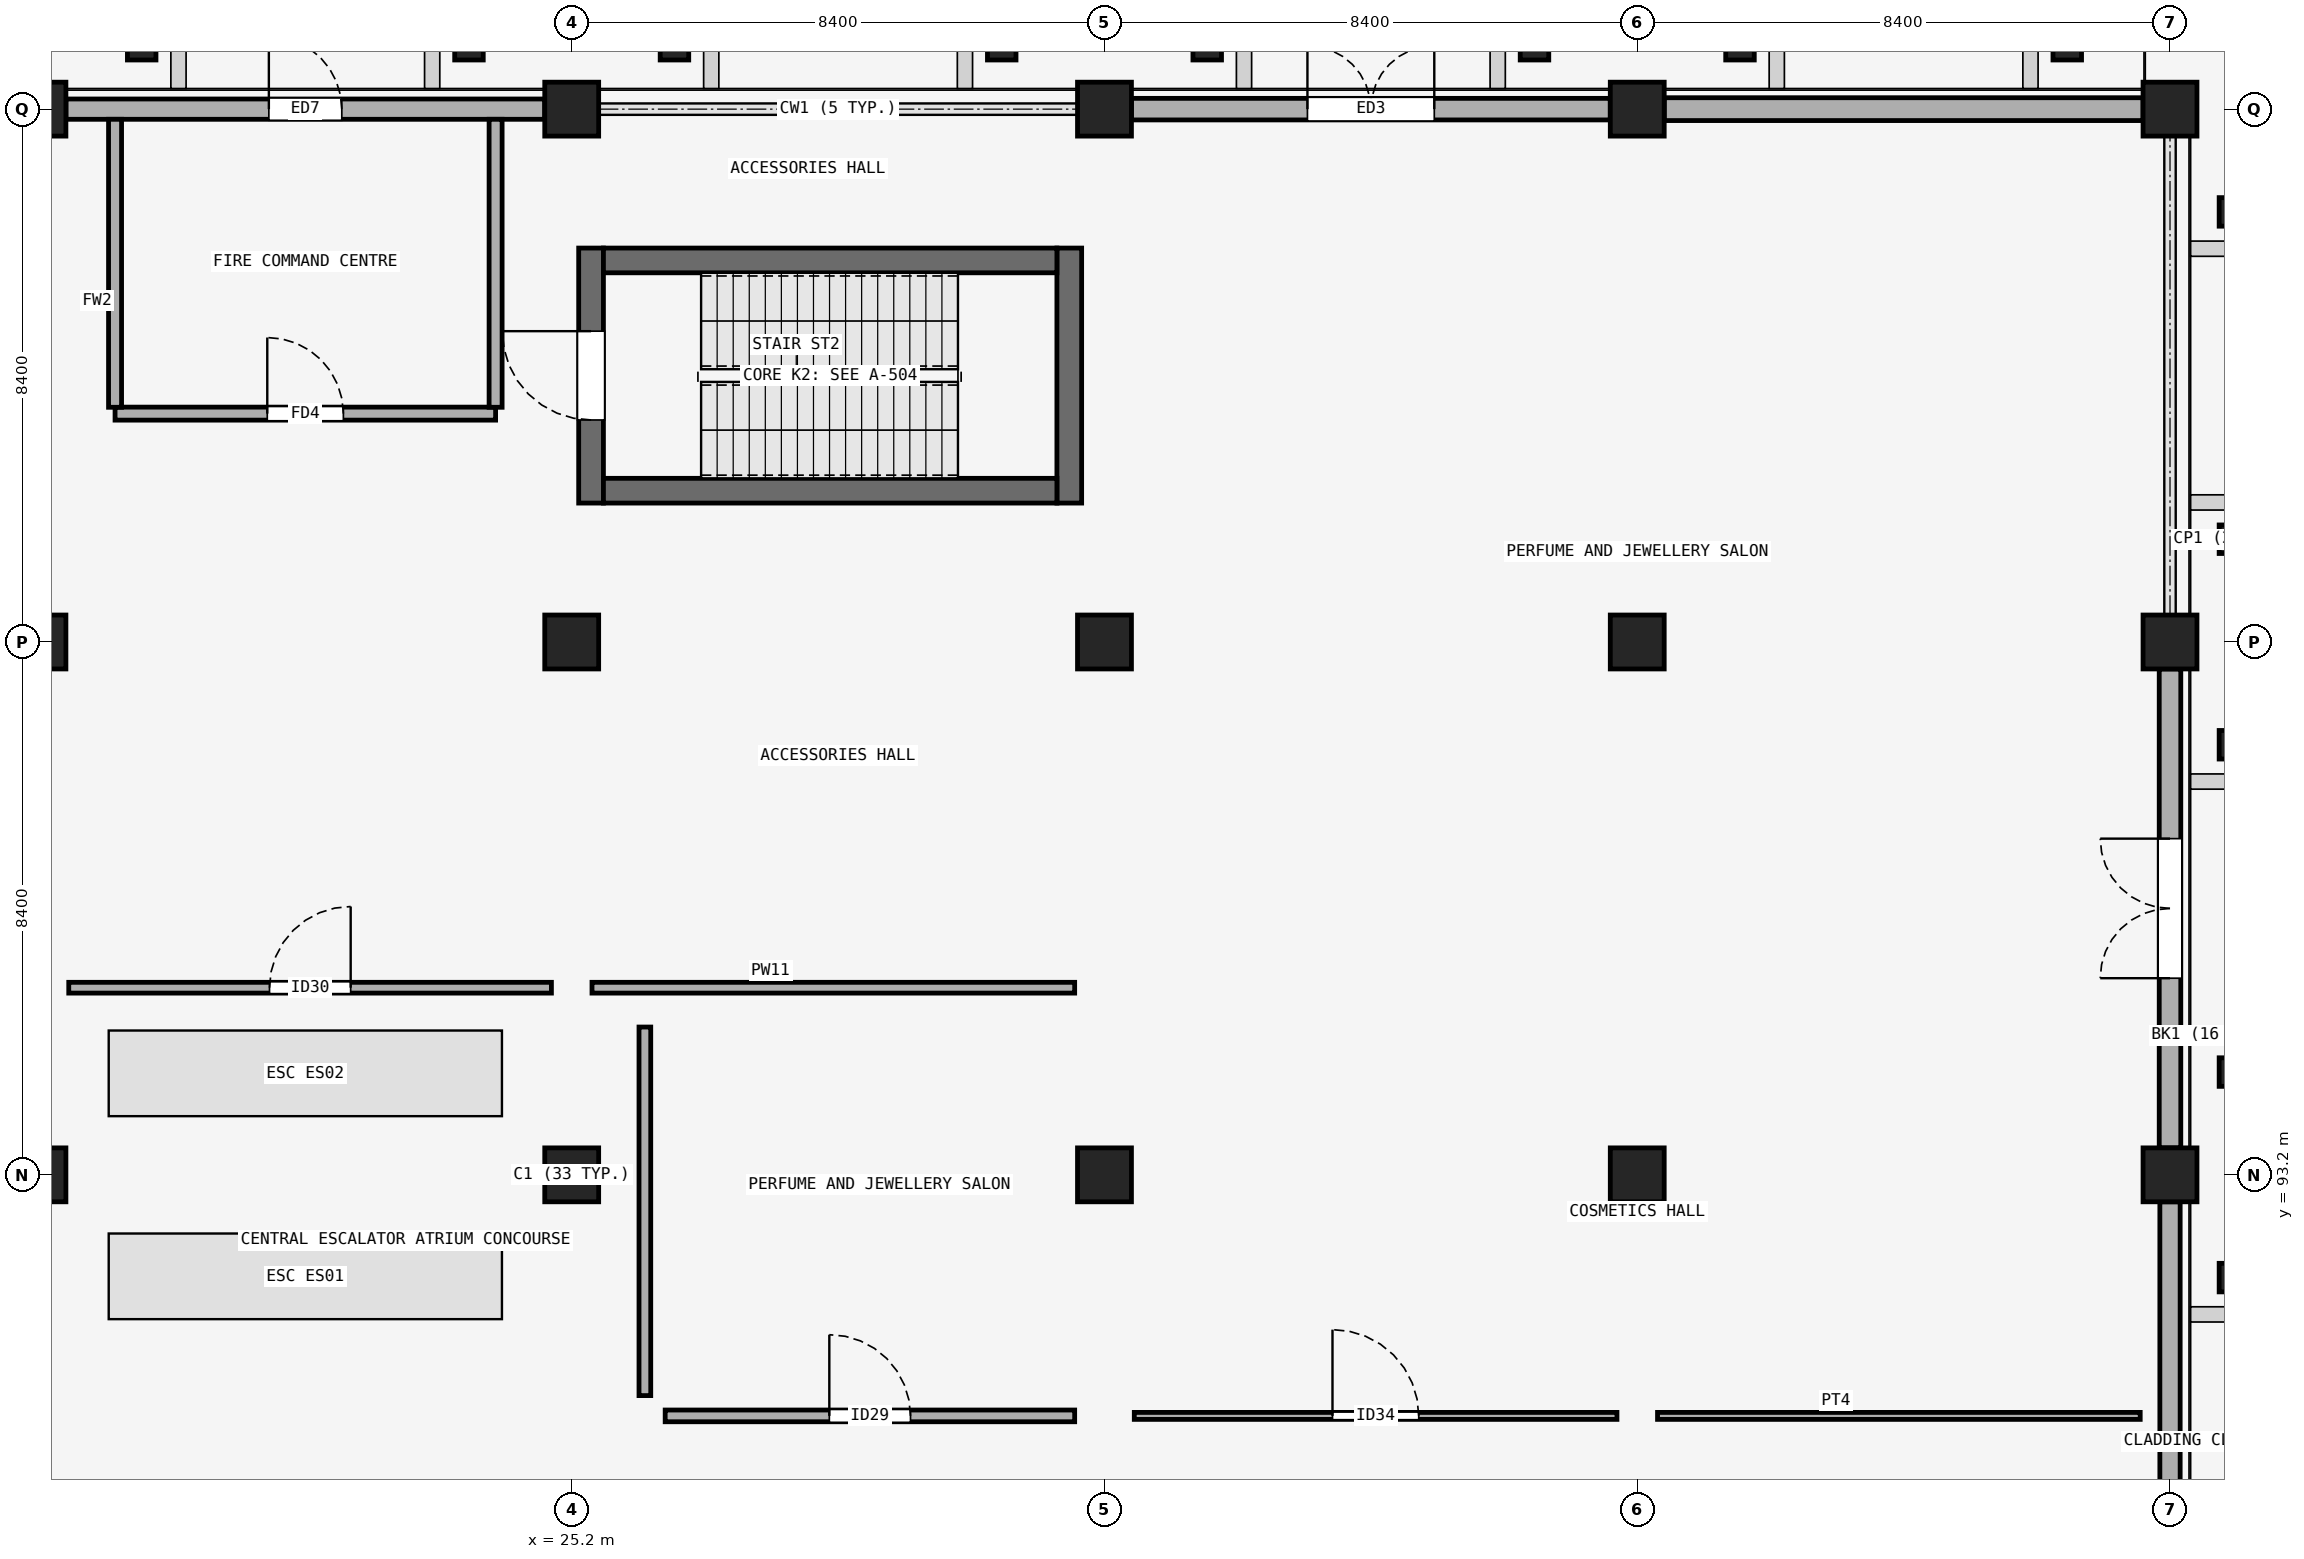
"""IFC4 building model, lengths in metres.
Left out: names, types, materials, properties, quantities, classifications, styles, units other than length and angle.
Written with IfcOpenShell. Run it as: python <this file> out.ifc"""

import sys

from ifc_helpers import new_model, si_unit, direction, frame, frame_2d, origin, origin_2d, place, context, subcontext, project, spatial, rectangle, extrude, element, fill, save


model = new_model("IFC4")
c1 = context("Model", 3, precision=1e-05, world=origin(), true_north=direction((0.0, 1.0)))
c2 = subcontext(c1, "Body", "Model", "MODEL_VIEW")
j1 = project(units=[si_unit("LENGTHUNIT", "METRE"), si_unit("PLANEANGLEUNIT", "RADIAN")], contexts=[c1])
p1 = place(None, origin())
s1 = spatial("IfcSite", under=j1, at=p1, CompositionType="ELEMENT")
p2 = place(p1, origin())
s2 = spatial("IfcBuilding", under=s1, at=p2, CompositionType="ELEMENT")
p3 = place(p2, origin())
s3 = spatial("IfcBuildingStorey", under=s2, at=p3, CompositionType="ELEMENT", Elevation=0.0)
for number, where, z_axis, x_axis in (
    (1, (16.8, 93.2, 0.0), (0.0, 0.0, 1.0), (1.0, 0.0, 0.0)),
    (2, (25.2, 93.2, 0.0), (0.0, 0.0, 1.0), (1.0, 0.0, 0.0)),
    (3, (33.6, 93.2, 0.0), (0.0, 0.0, 1.0), (1.0, 0.0, 0.0)),
    (4, (42.0, 93.2, 0.0), (0.0, 0.0, 1.0), (1.0, 0.0, 0.0)),
    (5, (50.4, 93.2, 0.0), (0.0, 0.0, 1.0), (1.0, 0.0, 0.0)),
    (6, (16.8, 101.6, 0.0), (0.0, 0.0, 1.0), (1.0, 0.0, 0.0)),
    (7, (25.2, 101.6, 0.0), (0.0, 0.0, 1.0), (1.0, 0.0, 0.0)),
    (8, (33.6, 101.6, 0.0), (0.0, 0.0, 1.0), (1.0, 0.0, 0.0)),
    (9, (42.0, 101.6, 0.0), (0.0, 0.0, 1.0), (1.0, 0.0, 0.0)),
    (10, (50.4, 101.6, 0.0), (0.0, 0.0, 1.0), (1.0, 0.0, 0.0)),
    (11, (16.8, 110.0, 0.0), (0.0, 0.0, 1.0), (1.0, 0.0, 0.0)),
    (12, (25.2, 110.0, 0.0), (0.0, 0.0, 1.0), (1.0, 0.0, 0.0)),
    (13, (33.6, 110.0, 0.0), (0.0, 0.0, 1.0), (1.0, 0.0, 0.0)),
    (14, (42.0, 110.0, 0.0), (0.0, 0.0, 1.0), (1.0, 0.0, 0.0)),
    (15, (50.4, 110.0, 0.0), (0.0, 0.0, 1.0), (1.0, 0.0, 0.0)),
):
    element("IfcColumn", number, at=place(p3, frame(where, z_axis=z_axis, x_axis=x_axis)), inside=s3, PredefinedType="COLUMN", context=c2, shape_type="SweptSolid", body=[
        extrude(rectangle(XDim=0.85, YDim=0.85, at=origin_2d()), origin(), (0.0, 0.0, 1.0), 5.4),
    ])
for number, where, z_axis, x_axis in (
    (16, (18.42, 111.05, 0.0), (0.0, 0.0, 1.0), (1.0, 0.0, 0.0)),
    (17, (23.58, 111.05, 0.0), (0.0, 0.0, 1.0), (1.0, 0.0, 0.0)),
    (18, (26.82, 111.05, 0.0), (0.0, 0.0, 1.0), (1.0, 0.0, 0.0)),
    (19, (31.98, 111.05, 0.0), (0.0, 0.0, 1.0), (1.0, 0.0, 0.0)),
    (20, (35.22, 111.05, 0.0), (0.0, 0.0, 1.0), (1.0, 0.0, 0.0)),
    (21, (40.38, 111.05, 0.0), (0.0, 0.0, 1.0), (1.0, 0.0, 0.0)),
    (22, (43.62, 111.05, 0.0), (0.0, 0.0, 1.0), (1.0, 0.0, 0.0)),
    (23, (48.78, 111.05, 0.0), (0.0, 0.0, 1.0), (1.0, 0.0, 0.0)),
    (24, (51.45, 91.58, 0.0), (0.0, 0.0, 1.0), (0.0, 1.0, 0.0)),
    (25, (51.45, 94.82, 0.0), (0.0, 0.0, 1.0), (0.0, 1.0, 0.0)),
    (26, (51.45, 99.98, 0.0), (0.0, 0.0, 1.0), (0.0, 1.0, 0.0)),
    (27, (51.45, 103.22, 0.0), (0.0, 0.0, 1.0), (0.0, 1.0, 0.0)),
    (28, (51.45, 108.38, 0.0), (0.0, 0.0, 1.0), (0.0, 1.0, 0.0)),
):
    element("IfcColumn", number, at=place(p3, frame(where, z_axis=z_axis, x_axis=x_axis)), inside=s3, PredefinedType="PILASTER", context=c2, shape_type="SweptSolid", body=[
        extrude(rectangle(XDim=0.45, YDim=0.55, at=origin_2d()), origin(), (0.0, 0.0, 1.0), 5.4),
    ])
p4 = place(p3, frame((17.225, 110.0, 0.0), z_axis=(0.0, 0.0, 1.0), x_axis=(1.0, 0.0, 0.0)))
e29 = element("IfcWall", 29, at=p4, inside=s3, PredefinedType="SOLIDWALL", context=c2, shape_type="SweptSolid", body=[
    extrude(rectangle(XDim=7.55, YDim=0.32, at=frame_2d((3.775, 0.0))), origin(), (0.0, 0.0, 1.0), 4.35),
])
p5 = place(p4, frame((3.2, 0.0, 0.0)))
e30 = element("IfcOpeningElement", 30, at=p5, cuts=e29, PredefinedType="OPENING", context=c2, shape_type="SweptSolid", body=[
    extrude(rectangle(XDim=1.15, YDim=2.15, at=frame_2d((0.575, 1.075))), frame((0.0, 0.17, 0.0), z_axis=(0.0, -1.0, 0.0), x_axis=(1.0, 0.0, 0.0)), (0.0, 0.0, 1.0), 0.34),
])
p6 = place(p3, frame((34.025, 110.0, 0.0), z_axis=(0.0, 0.0, 1.0), x_axis=(1.0, 0.0, 0.0)))
e31 = element("IfcWall", 31, at=p6, inside=s3, PredefinedType="SOLIDWALL", context=c2, shape_type="SweptSolid", body=[
    extrude(rectangle(XDim=7.55, YDim=0.34, at=frame_2d((3.775, 0.0))), origin(), (0.0, 0.0, 1.0), 4.35),
])
p7 = place(p6, frame((2.775, 0.0, 0.0)))
e32 = element("IfcOpeningElement", 32, at=p7, cuts=e31, PredefinedType="OPENING", context=c2, shape_type="SweptSolid", body=[
    extrude(rectangle(XDim=2.0, YDim=2.5, at=frame_2d((1.0, 1.25))), frame((0.0, 0.18, 0.0), z_axis=(0.0, -1.0, 0.0), x_axis=(1.0, 0.0, 0.0)), (0.0, 0.0, 1.0), 0.36),
])
p8 = place(p3, frame((42.425, 110.0, 0.0), z_axis=(0.0, 0.0, 1.0), x_axis=(1.0, 0.0, 0.0)))
e33 = element("IfcWall", 33, at=p8, inside=s3, PredefinedType="SOLIDWALL", context=c2, shape_type="SweptSolid", body=[
    extrude(rectangle(XDim=7.55, YDim=0.36, at=frame_2d((3.775, 0.0))), origin(), (0.0, 0.0, 1.0), 4.35),
])
p9 = place(p3, frame((50.4, 85.225, 0.0), z_axis=(0.0, 0.0, 1.0), x_axis=(0.0, 1.0, 0.0)))
e34 = element("IfcWall", 34, at=p9, inside=s3, PredefinedType="SOLIDWALL", context=c2, shape_type="SweptSolid", body=[
    extrude(rectangle(XDim=7.55, YDim=0.32, at=frame_2d((3.775, 0.0))), origin(), (0.0, 0.0, 1.0), 4.35),
])
p10 = place(p3, frame((50.4, 93.625, 0.0), z_axis=(0.0, 0.0, 1.0), x_axis=(0.0, 1.0, 0.0)))
e35 = element("IfcWall", 35, at=p10, inside=s3, PredefinedType="SOLIDWALL", context=c2, shape_type="SweptSolid", body=[
    extrude(rectangle(XDim=7.55, YDim=0.34, at=frame_2d((3.775, 0.0))), origin(), (0.0, 0.0, 1.0), 4.35),
])
p11 = place(p10, frame((2.675, 0.0, 0.0)))
e36 = element("IfcOpeningElement", 36, at=p11, cuts=e35, PredefinedType="OPENING", context=c2, shape_type="SweptSolid", body=[
    extrude(rectangle(XDim=2.2, YDim=2.55, at=frame_2d((1.1, 1.275))), frame((0.0, 0.18, 0.0), z_axis=(0.0, -1.0, 0.0), x_axis=(1.0, 0.0, 0.0)), (0.0, 0.0, 1.0), 0.36),
])
p12 = place(p3, frame((25.505, 103.79, 0.0), z_axis=(0.0, 0.0, 1.0), x_axis=(0.0, 1.0, 0.0)))
e37 = element("IfcWall", 37, at=p12, inside=s3, PredefinedType="SHEAR", context=c2, shape_type="SweptSolid", body=[
    extrude(rectangle(XDim=4.02, YDim=0.39, at=frame_2d((2.01, 0.0))), origin(), (0.0, 0.0, 1.0), 5.1),
])
p13 = place(p12, frame((1.31, 0.0, 0.0)))
e38 = element("IfcOpeningElement", 38, at=p13, cuts=e37, PredefinedType="OPENING", context=c2, shape_type="SweptSolid", body=[
    extrude(rectangle(XDim=1.4, YDim=2.15, at=frame_2d((0.7, 1.075))), frame((0.0, 0.205, 0.0), z_axis=(0.0, -1.0, 0.0), x_axis=(1.0, 0.0, 0.0)), (0.0, 0.0, 1.0), 0.41),
])
p14 = place(p3, frame((33.045, 103.79, 0.0), z_axis=(0.0, 0.0, 1.0), x_axis=(0.0, 1.0, 0.0)))
e39 = element("IfcWall", 39, at=p14, inside=s3, PredefinedType="SHEAR", context=c2, shape_type="SweptSolid", body=[
    extrude(rectangle(XDim=4.02, YDim=0.39, at=frame_2d((2.01, 0.0))), origin(), (0.0, 0.0, 1.0), 5.1),
])
for number, where, z_axis, x_axis in (
    (40, (25.7, 103.985, 0.0), (0.0, 0.0, 1.0), (1.0, 0.0, 0.0)),
    (41, (25.7, 107.615, 0.0), (0.0, 0.0, 1.0), (1.0, 0.0, 0.0)),
):
    element("IfcWall", number, at=place(p3, frame(where, z_axis=z_axis, x_axis=x_axis)), inside=s3, PredefinedType="SHEAR", context=c2, shape_type="SweptSolid", body=[
        extrude(rectangle(XDim=7.15, YDim=0.39, at=frame_2d((3.575, 0.0))), origin(), (0.0, 0.0, 1.0), 5.1),
    ])
p15 = place(p3, frame((18.0, 105.2, 0.0), z_axis=(0.0, 0.0, 1.0), x_axis=(1.0, 0.0, 0.0)))
e42 = element("IfcWall", 42, at=p15, inside=s3, PredefinedType="PARTITIONING", context=c2, shape_type="SweptSolid", body=[
    extrude(rectangle(XDim=6.0, YDim=0.205, at=frame_2d((3.0, 0.0))), origin(), (0.0, 0.0, 1.0), 5.1),
])
p16 = place(p15, frame((2.4, 0.0, 0.0)))
e43 = element("IfcOpeningElement", 43, at=p16, cuts=e42, PredefinedType="OPENING", context=c2, shape_type="SweptSolid", body=[
    extrude(rectangle(XDim=1.2, YDim=2.2, at=frame_2d((0.6, 1.1))), frame((0.0, 0.113, 0.0), z_axis=(0.0, -1.0, 0.0), x_axis=(1.0, 0.0, 0.0)), (0.0, 0.0, 1.0), 0.225),
])
for number, where, z_axis, x_axis in (
    (44, (18.0, 105.3, 0.0), (0.0, 0.0, 1.0), (0.0, 1.0, 0.0)),
    (45, (24.0, 105.3, 0.0), (0.0, 0.0, 1.0), (0.0, 1.0, 0.0)),
):
    element("IfcWall", number, at=place(p3, frame(where, z_axis=z_axis, x_axis=x_axis)), inside=s3, PredefinedType="PARTITIONING", context=c2, shape_type="SweptSolid", body=[
        extrude(rectangle(XDim=4.54, YDim=0.205, at=frame_2d((2.27, 0.0))), origin(), (0.0, 0.0, 1.0), 4.35),
    ])
p17 = place(p3, frame((26.674, 89.4, 0.0), z_axis=(0.0, 0.0, 1.0), x_axis=(1.0, 0.0, 0.0)))
e46 = element("IfcWall", 46, at=p17, inside=s3, PredefinedType="PARTITIONING", context=c2, shape_type="SweptSolid", body=[
    extrude(rectangle(XDim=6.456, YDim=0.185, at=frame_2d((3.228, 0.0))), origin(), (0.0, 0.0, 1.0), 5.1),
])
p18 = place(p17, frame((2.588, 0.0, 0.0)))
e47 = element("IfcOpeningElement", 47, at=p18, cuts=e46, PredefinedType="OPENING", context=c2, shape_type="SweptSolid", body=[
    extrude(rectangle(XDim=1.28, YDim=2.34, at=frame_2d((0.64, 1.17))), frame((0.0, 0.103, 0.0), z_axis=(0.0, -1.0, 0.0), x_axis=(1.0, 0.0, 0.0)), (0.0, 0.0, 1.0), 0.205),
])
p19 = place(p3, frame((26.354, 89.72, 0.0), z_axis=(0.0, 0.0, 1.0), x_axis=(0.0, 1.0, 0.0)))
e48 = element("IfcWall", 48, at=p19, inside=s3, PredefinedType="PARTITIONING", context=c2, shape_type="SweptSolid", body=[
    extrude(rectangle(XDim=5.81, YDim=0.185, at=frame_2d((2.905, 0.0))), origin(), (0.0, 0.0, 1.0), 4.4),
])
p20 = place(p3, frame((17.27, 96.15, 0.0), z_axis=(0.0, 0.0, 1.0), x_axis=(1.0, 0.0, 0.0)))
e49 = element("IfcWall", 49, at=p20, inside=s3, PredefinedType="PARTITIONING", context=c2, shape_type="SweptSolid", body=[
    extrude(rectangle(XDim=7.61, YDim=0.17, at=frame_2d((3.805, 0.0))), origin(), (0.0, 0.0, 1.0), 5.1),
])
p21 = place(p20, frame((3.165, 0.0, 0.0)))
e50 = element("IfcOpeningElement", 50, at=p21, cuts=e49, PredefinedType="OPENING", context=c2, shape_type="SweptSolid", body=[
    extrude(rectangle(XDim=1.28, YDim=2.46, at=frame_2d((0.64, 1.23))), frame((0.0, 0.095, 0.0), z_axis=(0.0, -1.0, 0.0), x_axis=(1.0, 0.0, 0.0)), (0.0, 0.0, 1.0), 0.19),
])
p22 = place(p3, frame((25.52, 96.15, 0.0), z_axis=(0.0, 0.0, 1.0), x_axis=(1.0, 0.0, 0.0)))
e51 = element("IfcWall", 51, at=p22, inside=s3, PredefinedType="PARTITIONING", context=c2, shape_type="SweptSolid", body=[
    extrude(rectangle(XDim=7.61, YDim=0.17, at=frame_2d((3.805, 0.0))), origin(), (0.0, 0.0, 1.0), 5.1),
])
p23 = place(p3, frame((34.07, 89.4, 0.0), z_axis=(0.0, 0.0, 1.0), x_axis=(1.0, 0.0, 0.0)))
e52 = element("IfcWall", 52, at=p23, inside=s3, PredefinedType="PARTITIONING", context=c2, shape_type="SweptSolid", body=[
    extrude(rectangle(XDim=7.61, YDim=0.11, at=frame_2d((3.805, 0.0))), origin(), (0.0, 0.0, 1.0), 5.1),
])
p24 = place(p23, frame((3.125, 0.0, 0.0)))
e53 = element("IfcOpeningElement", 53, at=p24, cuts=e52, PredefinedType="OPENING", context=c2, shape_type="SweptSolid", body=[
    extrude(rectangle(XDim=1.36, YDim=2.46, at=frame_2d((0.68, 1.23))), frame((0.0, 0.065, 0.0), z_axis=(0.0, -1.0, 0.0), x_axis=(1.0, 0.0, 0.0)), (0.0, 0.0, 1.0), 0.13),
])
p25 = place(p3, frame((42.32, 89.4, 0.0), z_axis=(0.0, 0.0, 1.0), x_axis=(1.0, 0.0, 0.0)))
e54 = element("IfcWall", 54, at=p25, inside=s3, PredefinedType="PARTITIONING", context=c2, shape_type="SweptSolid", body=[
    extrude(rectangle(XDim=7.61, YDim=0.11, at=frame_2d((3.805, 0.0))), origin(), (0.0, 0.0, 1.0), 5.1),
])
p26 = place(p5, origin())
e55 = element("IfcDoor", 55, at=p26, inside=s3, OperationType="SINGLE_SWING_LEFT", PredefinedType="DOOR", context=c2, shape_type="SweptSolid", body=[
    extrude(rectangle(XDim=1.15, YDim=2.15, at=frame_2d((0.575, 1.075))), frame((0.0, 0.025, 0.0), z_axis=(0.0, -1.0, 0.0), x_axis=(1.0, 0.0, 0.0)), (0.0, 0.0, 1.0), 0.05),
])
fill(e30, e55)
p27 = place(p7, origin())
e56 = element("IfcDoor", 56, at=p27, inside=s3, OperationType="DOUBLE_DOOR_SINGLE_SWING", PredefinedType="DOOR", context=c2, shape_type="SweptSolid", body=[
    extrude(rectangle(XDim=2.0, YDim=2.5, at=frame_2d((1.0, 1.25))), frame((0.0, 0.025, 0.0), z_axis=(0.0, -1.0, 0.0), x_axis=(1.0, 0.0, 0.0)), (0.0, 0.0, 1.0), 0.05),
])
fill(e32, e56)
p28 = place(p11, origin())
e57 = element("IfcDoor", 57, at=p28, inside=s3, OperationType="DOUBLE_DOOR_SINGLE_SWING", PredefinedType="DOOR", context=c2, shape_type="SweptSolid", body=[
    extrude(rectangle(XDim=2.2, YDim=2.55, at=frame_2d((1.1, 1.275))), frame((0.0, 0.025, 0.0), z_axis=(0.0, -1.0, 0.0), x_axis=(1.0, 0.0, 0.0)), (0.0, 0.0, 1.0), 0.05),
])
fill(e36, e57)
p29 = place(p13, origin())
e58 = element("IfcDoor", 58, at=p29, inside=s3, OperationType="SINGLE_SWING_RIGHT", PredefinedType="DOOR", context=c2, shape_type="SweptSolid", body=[
    extrude(rectangle(XDim=1.4, YDim=2.15, at=frame_2d((0.7, 1.075))), frame((0.0, 0.025, 0.0), z_axis=(0.0, -1.0, 0.0), x_axis=(1.0, 0.0, 0.0)), (0.0, 0.0, 1.0), 0.05),
])
fill(e38, e58)
p30 = place(p16, origin())
e59 = element("IfcDoor", 59, at=p30, inside=s3, OperationType="SINGLE_SWING_LEFT", PredefinedType="DOOR", context=c2, shape_type="SweptSolid", body=[
    extrude(rectangle(XDim=1.2, YDim=2.2, at=frame_2d((0.6, 1.1))), frame((0.0, 0.025, 0.0), z_axis=(0.0, -1.0, 0.0), x_axis=(1.0, 0.0, 0.0)), (0.0, 0.0, 1.0), 0.05),
])
fill(e43, e59)
p31 = place(p18, origin())
e60 = element("IfcDoor", 60, at=p31, inside=s3, OperationType="SINGLE_SWING_LEFT", PredefinedType="DOOR", context=c2, shape_type="SweptSolid", body=[
    extrude(rectangle(XDim=1.28, YDim=2.34, at=frame_2d((0.64, 1.17))), frame((0.0, 0.025, 0.0), z_axis=(0.0, -1.0, 0.0), x_axis=(1.0, 0.0, 0.0)), (0.0, 0.0, 1.0), 0.05),
])
fill(e47, e60)
p32 = place(p21, origin())
e61 = element("IfcDoor", 61, at=p32, inside=s3, OperationType="SINGLE_SWING_RIGHT", PredefinedType="DOOR", context=c2, shape_type="SweptSolid", body=[
    extrude(rectangle(XDim=1.28, YDim=2.46, at=frame_2d((0.64, 1.23))), frame((0.0, 0.025, 0.0), z_axis=(0.0, -1.0, 0.0), x_axis=(1.0, 0.0, 0.0)), (0.0, 0.0, 1.0), 0.05),
])
fill(e50, e61)
p33 = place(p24, origin())
e62 = element("IfcDoor", 62, at=p33, inside=s3, OperationType="SINGLE_SWING_LEFT", PredefinedType="DOOR", context=c2, shape_type="SweptSolid", body=[
    extrude(rectangle(XDim=1.36, YDim=2.46, at=frame_2d((0.68, 1.23))), frame((0.0, 0.025, 0.0), z_axis=(0.0, -1.0, 0.0), x_axis=(1.0, 0.0, 0.0)), (0.0, 0.0, 1.0), 0.05),
])
fill(e53, e62)
save(model, sys.argv[1])
